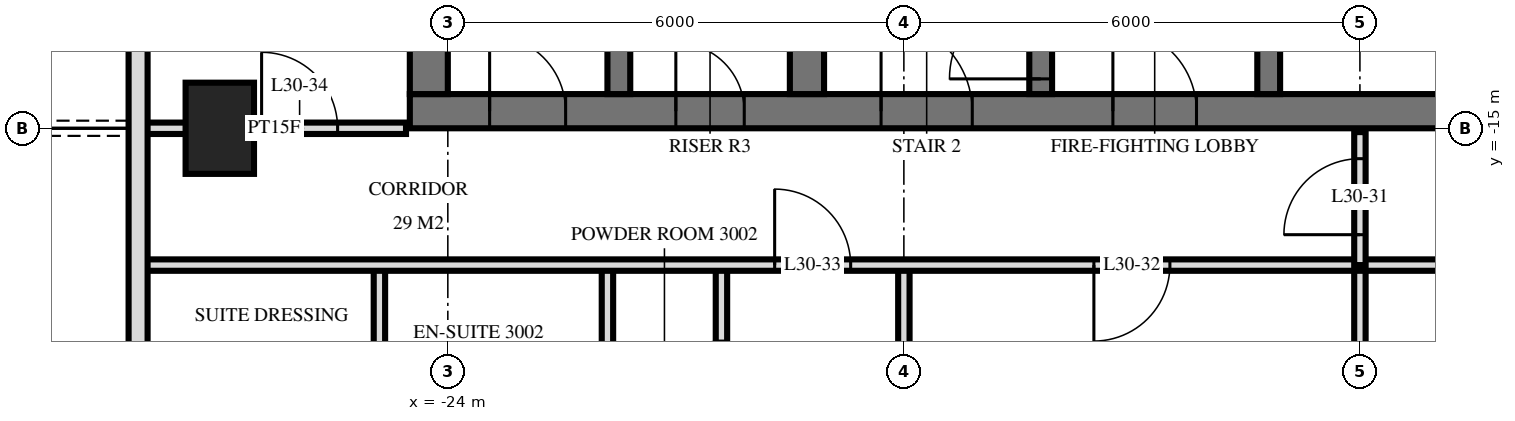
"""IFC4 building model, lengths in metres.
Left out: names, types, materials, properties, quantities, classifications, styles, units other than length and angle.
Written with IfcOpenShell. Run it as: python <this file> out.ifc"""

import sys

from ifc_helpers import new_model, si_unit, direction, frame, frame_2d, origin, origin_2d, place, context, subcontext, project, spatial, rectangle, extrude, element, fill, save


model = new_model("IFC4")
c1 = context("Model", 3, precision=1e-05, world=origin(), true_north=direction((0.0, 1.0)))
c2 = subcontext(c1, "Body", "Model", "MODEL_VIEW")
j1 = project(units=[si_unit("LENGTHUNIT", "METRE"), si_unit("PLANEANGLEUNIT", "RADIAN")], contexts=[c1])
p1 = place(None, origin())
s1 = spatial("IfcSite", under=j1, at=p1, CompositionType="ELEMENT")
p2 = place(p1, origin())
s2 = spatial("IfcBuilding", under=s1, at=p2, CompositionType="ELEMENT")
p3 = place(p2, frame((0.0, 0.0, 120.0)))
s3 = spatial("IfcBuildingStorey", under=s2, at=p3, CompositionType="ELEMENT", Elevation=120.0)
p4 = place(p3, frame((-27.0, -15.0, 0.0), z_axis=(0.0, 0.0, 1.0), x_axis=(0.0, 1.0, 0.0)))
e1 = element("IfcColumn", 1, at=p4, inside=s3, PredefinedType="COLUMN", context=c2, shape_type="SweptSolid", body=[
    extrude(rectangle(XDim=1.2, YDim=0.9, at=origin_2d()), origin(), (0.0, 0.0, 1.0), 3.6),
])
p5 = place(p3, frame((-24.5, -14.775, 0.0), z_axis=(0.0, 0.0, 1.0), x_axis=(1.0, 0.0, 0.0)))
e2 = element("IfcWall", 2, at=p5, inside=s3, PredefinedType="SHEAR", context=c2, shape_type="SweptSolid", body=[
    extrude(rectangle(XDim=14.5, YDim=0.45, at=frame_2d((7.25, 0.0))), origin(), (0.0, 0.0, 1.0), 3.6),
])
p6 = place(p5, frame((6.2, 0.0, 0.0)))
e3 = element("IfcOpeningElement", 3, at=p6, cuts=e2, PredefinedType="OPENING", context=c2, shape_type="SweptSolid", body=[
    extrude(rectangle(XDim=1.2, YDim=2.1, at=frame_2d((0.6, 1.05))), frame((0.0, 0.235, 0.0), z_axis=(0.0, -1.0, 0.0), x_axis=(1.0, 0.0, 0.0)), (0.0, 0.0, 1.0), 0.47),
])
p7 = place(p5, frame((9.25, 0.0, 0.0)))
e4 = element("IfcOpeningElement", 4, at=p7, cuts=e2, PredefinedType="OPENING", context=c2, shape_type="SweptSolid", body=[
    extrude(rectangle(XDim=1.1, YDim=2.1, at=frame_2d((0.55, 1.05))), frame((0.0, 0.235, 0.0), z_axis=(0.0, -1.0, 0.0), x_axis=(1.0, 0.0, 0.0)), (0.0, 0.0, 1.0), 0.47),
])
p8 = place(p5, frame((3.5, 0.0, 0.0)))
e5 = element("IfcOpeningElement", 5, at=p8, cuts=e2, PredefinedType="OPENING", context=c2, shape_type="SweptSolid", body=[
    extrude(rectangle(XDim=0.9, YDim=2.1, at=frame_2d((0.45, 1.05))), frame((0.0, 0.235, 0.0), z_axis=(0.0, -1.0, 0.0), x_axis=(1.0, 0.0, 0.0)), (0.0, 0.0, 1.0), 0.47),
])
p9 = place(p5, frame((1.05, 0.0, 0.0)))
e6 = element("IfcOpeningElement", 6, at=p9, cuts=e2, PredefinedType="OPENING", context=c2, shape_type="SweptSolid", body=[
    extrude(rectangle(XDim=1.0, YDim=2.1, at=frame_2d((0.5, 1.05))), frame((0.0, 0.235, 0.0), z_axis=(0.0, -1.0, 0.0), x_axis=(1.0, 0.0, 0.0)), (0.0, 0.0, 1.0), 0.47),
])
p10 = place(p3, frame((-24.25, -14.55, 0.0), z_axis=(0.0, 0.0, 1.0), x_axis=(0.0, 1.0, 0.0)))
e7 = element("IfcWall", 7, at=p10, inside=s3, PredefinedType="SHEAR", context=c2, shape_type="SweptSolid", body=[
    extrude(rectangle(XDim=14.1, YDim=0.5, at=frame_2d((7.05, 0.0))), origin(), (0.0, 0.0, 1.0), 3.6),
])
p11 = place(p3, frame((-13.2, -14.55, 0.0), z_axis=(0.0, 0.0, 1.0), x_axis=(0.0, 1.0, 0.0)))
e8 = element("IfcWall", 8, at=p11, inside=s3, PredefinedType="SHEAR", context=c2, shape_type="SweptSolid", body=[
    extrude(rectangle(XDim=5.4, YDim=0.3, at=frame_2d((2.7, 0.0))), origin(), (0.0, 0.0, 1.0), 3.6),
])
p12 = place(p11, frame((4.0, 0.0, 0.0)))
e9 = element("IfcOpeningElement", 9, at=p12, cuts=e8, PredefinedType="OPENING", context=c2, shape_type="SweptSolid", body=[
    extrude(rectangle(XDim=1.2, YDim=2.1, at=frame_2d((0.6, 1.05))), frame((0.0, 0.16, 0.0), z_axis=(0.0, -1.0, 0.0), x_axis=(1.0, 0.0, 0.0)), (0.0, 0.0, 1.0), 0.32),
])
p13 = place(p3, frame((-16.2, -14.55, 0.0), z_axis=(0.0, 0.0, 1.0), x_axis=(0.0, 1.0, 0.0)))
e10 = element("IfcWall", 10, at=p13, inside=s3, PredefinedType="SHEAR", context=c2, shape_type="SweptSolid", body=[
    extrude(rectangle(XDim=5.4, YDim=0.3, at=frame_2d((2.7, 0.0))), origin(), (0.0, 0.0, 1.0), 3.6),
])
p14 = place(p13, frame((0.2, 0.0, 0.0)))
e11 = element("IfcOpeningElement", 11, at=p14, cuts=e10, PredefinedType="OPENING", context=c2, shape_type="SweptSolid", body=[
    extrude(rectangle(XDim=1.2, YDim=2.1, at=frame_2d((0.6, 1.05))), frame((0.0, 0.16, 0.0), z_axis=(0.0, -1.0, 0.0), x_axis=(1.0, 0.0, 0.0)), (0.0, 0.0, 1.0), 0.32),
])
p15 = place(p3, frame((-19.275, -14.55, 0.0), z_axis=(0.0, 0.0, 1.0), x_axis=(0.0, 1.0, 0.0)))
e12 = element("IfcWall", 12, at=p15, inside=s3, PredefinedType="SHEAR", context=c2, shape_type="SweptSolid", body=[
    extrude(rectangle(XDim=5.4, YDim=0.45, at=frame_2d((2.7, 0.0))), origin(), (0.0, 0.0, 1.0), 3.6),
])
p16 = place(p3, frame((-21.75, -14.55, 0.0), z_axis=(0.0, 0.0, 1.0), x_axis=(0.0, 1.0, 0.0)))
e13 = element("IfcWall", 13, at=p16, inside=s3, PredefinedType="SHEAR", context=c2, shape_type="SweptSolid", body=[
    extrude(rectangle(XDim=5.4, YDim=0.3, at=frame_2d((2.7, 0.0))), origin(), (0.0, 0.0, 1.0), 3.6),
])
p17 = place(p3, frame((-28.075, -3.325, 0.0), z_axis=(0.0, 0.0, 1.0), x_axis=(0.0, -1.0, 0.0)))
e14 = element("IfcWall", 14, at=p17, inside=s3, PredefinedType="SOLIDWALL", context=c2, shape_type="SweptSolid", body=[
    extrude(rectangle(XDim=25.951, YDim=0.25, at=frame_2d((12.975, 0.0))), origin(), (0.0, 0.0, 1.0), 3.32),
])
p18 = place(p17, frame((7.025, 0.0, 0.0)))
e15 = element("IfcOpeningElement", 15, at=p18, cuts=e14, PredefinedType="OPENING", context=c2, shape_type="SweptSolid", body=[
    extrude(rectangle(XDim=1.8, YDim=2.4, at=frame_2d((0.9, 1.2))), frame((0.0, 0.135, 0.0), z_axis=(0.0, -1.0, 0.0), x_axis=(1.0, 0.0, 0.0)), (0.0, 0.0, 1.0), 0.27),
])
p19 = place(p17, frame((18.175, 0.0, 0.0)))
e16 = element("IfcOpeningElement", 16, at=p19, cuts=e14, PredefinedType="OPENING", context=c2, shape_type="SweptSolid", body=[
    extrude(rectangle(XDim=1.8, YDim=2.4, at=frame_2d((0.9, 1.2))), frame((0.0, 0.135, 0.0), z_axis=(0.0, -1.0, 0.0), x_axis=(1.0, 0.0, 0.0)), (0.0, 0.0, 1.0), 0.27),
])
p20 = place(p17, frame((21.075, 0.0, 0.0)))
e17 = element("IfcOpeningElement", 17, at=p20, cuts=e14, PredefinedType="OPENING", context=c2, shape_type="SweptSolid", body=[
    extrude(rectangle(XDim=1.8, YDim=2.4, at=frame_2d((0.9, 1.2))), frame((0.0, 0.135, 0.0), z_axis=(0.0, -1.0, 0.0), x_axis=(1.0, 0.0, 0.0)), (0.0, 0.0, 1.0), 0.27),
])
p21 = place(p17, frame((23.825, 0.0, 0.3)))
e18 = element("IfcOpeningElement", 18, at=p21, cuts=e14, PredefinedType="OPENING", context=c2, shape_type="SweptSolid", body=[
    extrude(rectangle(XDim=1.8, YDim=2.1, at=frame_2d((0.9, 1.05))), frame((0.0, 0.135, 0.0), z_axis=(0.0, -1.0, 0.0), x_axis=(1.0, 0.0, 0.0)), (0.0, 0.0, 1.0), 0.27),
])
p22 = place(p3, frame((-12.0, -16.8, 0.0), z_axis=(0.0, 0.0, 1.0), x_axis=(0.0, 1.0, 0.0)))
e19 = element("IfcWall", 19, at=p22, inside=s3, PredefinedType="PARTITIONING", context=c2, shape_type="SweptSolid", body=[
    extrude(rectangle(XDim=1.75, YDim=0.15, at=frame_2d((0.875, 0.0))), origin(), (0.0, 0.0, 1.0), 3.32),
])
p23 = place(p22, frame((0.4, 0.0, 0.0)))
e20 = element("IfcOpeningElement", 20, at=p23, cuts=e19, PredefinedType="OPENING", context=c2, shape_type="SweptSolid", body=[
    extrude(rectangle(XDim=1.0, YDim=2.1, at=frame_2d((0.5, 1.05))), frame((0.0, 0.085, 0.0), z_axis=(0.0, -1.0, 0.0), x_axis=(1.0, 0.0, 0.0)), (0.0, 0.0, 1.0), 0.17),
])
p24 = place(p3, frame((-12.0, -33.62, 0.0), z_axis=(0.0, 0.0, 1.0), x_axis=(0.0, 1.0, 0.0)))
e21 = element("IfcWall", 21, at=p24, inside=s3, PredefinedType="PARTITIONING", context=c2, shape_type="SweptSolid", body=[
    extrude(rectangle(XDim=16.82, YDim=0.15, at=frame_2d((8.41, 0.0))), origin(), (0.0, 0.0, 1.0), 3.32),
])
p25 = place(p3, frame((-18.0, -19.8, 0.0), z_axis=(0.0, 0.0, 1.0), x_axis=(0.0, 1.0, 0.0)))
e22 = element("IfcWall", 22, at=p25, inside=s3, PredefinedType="PARTITIONING", context=c2, shape_type="SweptSolid", body=[
    extrude(rectangle(XDim=3.0, YDim=0.15, at=frame_2d((1.5, 0.0))), origin(), (0.0, 0.0, 1.0), 3.32),
])
p26 = place(p3, frame((-20.4, -19.8, 0.0), z_axis=(0.0, 0.0, 1.0), x_axis=(0.0, 1.0, 0.0)))
e23 = element("IfcWall", 23, at=p26, inside=s3, PredefinedType="PARTITIONING", context=c2, shape_type="SweptSolid", body=[
    extrude(rectangle(XDim=3.0, YDim=0.15, at=frame_2d((1.5, 0.0))), origin(), (0.0, 0.0, 1.0), 3.32),
])
p27 = place(p26, frame((1.0, 0.0, 0.0)))
e24 = element("IfcOpeningElement", 24, at=p27, cuts=e23, PredefinedType="OPENING", context=c2, shape_type="SweptSolid", body=[
    extrude(rectangle(XDim=1.0, YDim=2.1, at=frame_2d((0.5, 1.05))), frame((0.0, 0.085, 0.0), z_axis=(0.0, -1.0, 0.0), x_axis=(1.0, 0.0, 0.0)), (0.0, 0.0, 1.0), 0.17),
])
p28 = place(p3, frame((-21.9, -19.8, 0.0), z_axis=(0.0, 0.0, 1.0), x_axis=(0.0, 1.0, 0.0)))
e25 = element("IfcWall", 25, at=p28, inside=s3, PredefinedType="PLUMBINGWALL", context=c2, shape_type="SweptSolid", body=[
    extrude(rectangle(XDim=3.0, YDim=0.15, at=frame_2d((1.5, 0.0))), origin(), (0.0, 0.0, 1.0), 3.32),
])
p29 = place(p3, frame((-24.9, -19.8, 0.0), z_axis=(0.0, 0.0, 1.0), x_axis=(0.0, 1.0, 0.0)))
e26 = element("IfcWall", 26, at=p29, inside=s3, PredefinedType="PARTITIONING", context=c2, shape_type="SweptSolid", body=[
    extrude(rectangle(XDim=3.0, YDim=0.15, at=frame_2d((1.5, 0.0))), origin(), (0.0, 0.0, 1.0), 3.32),
])
p30 = place(p3, frame((-28.02, -16.8, 0.0), z_axis=(0.0, 0.0, 1.0), x_axis=(1.0, 0.0, 0.0)))
e27 = element("IfcWall", 27, at=p30, inside=s3, PredefinedType="PARTITIONING", context=c2, shape_type="SweptSolid", body=[
    extrude(rectangle(XDim=56.04, YDim=0.15, at=frame_2d((28.02, 0.0))), origin(), (0.0, 0.0, 1.0), 3.32),
])
p31 = place(p30, frame((12.52, 0.0, 0.0)))
e28 = element("IfcOpeningElement", 28, at=p31, cuts=e27, PredefinedType="OPENING", context=c2, shape_type="SweptSolid", body=[
    extrude(rectangle(XDim=1.0, YDim=2.1, at=frame_2d((0.5, 1.05))), frame((0.0, 0.085, 0.0), z_axis=(0.0, -1.0, 0.0), x_axis=(1.0, 0.0, 0.0)), (0.0, 0.0, 1.0), 0.17),
])
p32 = place(p30, frame((8.32, 0.0, 0.0)))
e29 = element("IfcOpeningElement", 29, at=p32, cuts=e27, PredefinedType="OPENING", context=c2, shape_type="SweptSolid", body=[
    extrude(rectangle(XDim=1.0, YDim=2.1, at=frame_2d((0.5, 1.05))), frame((0.0, 0.085, 0.0), z_axis=(0.0, -1.0, 0.0), x_axis=(1.0, 0.0, 0.0)), (0.0, 0.0, 1.0), 0.17),
])
p33 = place(p30, frame((40.42, 0.0, 0.0)))
e30 = element("IfcOpeningElement", 30, at=p33, cuts=e27, PredefinedType="OPENING", context=c2, shape_type="SweptSolid", body=[
    extrude(rectangle(XDim=1.0, YDim=2.1, at=frame_2d((0.5, 1.05))), frame((0.0, 0.085, 0.0), z_axis=(0.0, -1.0, 0.0), x_axis=(1.0, 0.0, 0.0)), (0.0, 0.0, 1.0), 0.17),
])
p34 = place(p30, frame((46.72, 0.0, 0.0)))
e31 = element("IfcOpeningElement", 31, at=p34, cuts=e27, PredefinedType="OPENING", context=c2, shape_type="SweptSolid", body=[
    extrude(rectangle(XDim=1.0, YDim=2.1, at=frame_2d((0.5, 1.05))), frame((0.0, 0.085, 0.0), z_axis=(0.0, -1.0, 0.0), x_axis=(1.0, 0.0, 0.0)), (0.0, 0.0, 1.0), 0.17),
])
p35 = place(p30, frame((21.52, 0.0, 0.0)))
e32 = element("IfcOpeningElement", 32, at=p35, cuts=e27, PredefinedType="OPENING", context=c2, shape_type="SweptSolid", body=[
    extrude(rectangle(XDim=1.0, YDim=2.1, at=frame_2d((0.5, 1.05))), frame((0.0, 0.085, 0.0), z_axis=(0.0, -1.0, 0.0), x_axis=(1.0, 0.0, 0.0)), (0.0, 0.0, 1.0), 0.17),
])
p36 = place(p30, frame((30.52, 0.0, 0.0)))
e33 = element("IfcOpeningElement", 33, at=p36, cuts=e27, PredefinedType="OPENING", context=c2, shape_type="SweptSolid", body=[
    extrude(rectangle(XDim=1.0, YDim=2.1, at=frame_2d((0.5, 1.05))), frame((0.0, 0.085, 0.0), z_axis=(0.0, -1.0, 0.0), x_axis=(1.0, 0.0, 0.0)), (0.0, 0.0, 1.0), 0.17),
])
p37 = place(p30, frame((36.52, 0.0, 0.0)))
e34 = element("IfcOpeningElement", 34, at=p37, cuts=e27, PredefinedType="OPENING", context=c2, shape_type="SweptSolid", body=[
    extrude(rectangle(XDim=1.0, YDim=2.1, at=frame_2d((0.5, 1.05))), frame((0.0, 0.085, 0.0), z_axis=(0.0, -1.0, 0.0), x_axis=(1.0, 0.0, 0.0)), (0.0, 0.0, 1.0), 0.17),
])
p38 = place(p3, frame((-28.02, -15.0, 0.0), z_axis=(0.0, 0.0, 1.0), x_axis=(1.0, 0.0, 0.0)))
e35 = element("IfcWall", 35, at=p38, inside=s3, PredefinedType="PARTITIONING", context=c2, shape_type="SweptSolid", body=[
    extrude(rectangle(XDim=3.47, YDim=0.15, at=frame_2d((1.735, 0.0))), origin(), (0.0, 0.0, 1.0), 3.32),
])
p39 = place(p38, frame((1.57, 0.0, 0.0)))
e36 = element("IfcOpeningElement", 36, at=p39, cuts=e35, PredefinedType="OPENING", context=c2, shape_type="SweptSolid", body=[
    extrude(rectangle(XDim=1.0, YDim=2.1, at=frame_2d((0.5, 1.05))), frame((0.0, 0.085, 0.0), z_axis=(0.0, -1.0, 0.0), x_axis=(1.0, 0.0, 0.0)), (0.0, 0.0, 1.0), 0.17),
])
p40 = place(p6, origin())
e37 = element("IfcDoor", 37, at=p40, inside=s3, OperationType="SINGLE_SWING_RIGHT", PredefinedType="DOOR", context=c2, shape_type="SweptSolid", body=[
    extrude(rectangle(XDim=1.2, YDim=2.1, at=frame_2d((0.6, 1.05))), frame((0.0, 0.025, 0.0), z_axis=(0.0, -1.0, 0.0), x_axis=(1.0, 0.0, 0.0)), (0.0, 0.0, 1.0), 0.05),
])
fill(e3, e37)
p41 = place(p7, origin())
e38 = element("IfcDoor", 38, at=p41, inside=s3, OperationType="SINGLE_SWING_RIGHT", PredefinedType="DOOR", context=c2, shape_type="SweptSolid", body=[
    extrude(rectangle(XDim=1.1, YDim=2.1, at=frame_2d((0.55, 1.05))), frame((0.0, 0.025, 0.0), z_axis=(0.0, -1.0, 0.0), x_axis=(1.0, 0.0, 0.0)), (0.0, 0.0, 1.0), 0.05),
])
fill(e4, e38)
p42 = place(p8, origin())
e39 = element("IfcDoor", 39, at=p42, inside=s3, OperationType="SINGLE_SWING_RIGHT", PredefinedType="DOOR", context=c2, shape_type="SweptSolid", body=[
    extrude(rectangle(XDim=0.9, YDim=2.1, at=frame_2d((0.45, 1.05))), frame((0.0, 0.025, 0.0), z_axis=(0.0, -1.0, 0.0), x_axis=(1.0, 0.0, 0.0)), (0.0, 0.0, 1.0), 0.05),
])
fill(e5, e39)
p43 = place(p9, origin())
e40 = element("IfcDoor", 40, at=p43, inside=s3, OperationType="SINGLE_SWING_RIGHT", PredefinedType="DOOR", context=c2, shape_type="SweptSolid", body=[
    extrude(rectangle(XDim=1.0, YDim=2.1, at=frame_2d((0.5, 1.05))), frame((0.0, 0.025, 0.0), z_axis=(0.0, -1.0, 0.0), x_axis=(1.0, 0.0, 0.0)), (0.0, 0.0, 1.0), 0.05),
])
fill(e6, e40)
p44 = place(p14, origin())
e41 = element("IfcDoor", 41, at=p44, inside=s3, OperationType="SINGLE_SWING_RIGHT", PredefinedType="DOOR", context=c2, shape_type="SweptSolid", body=[
    extrude(rectangle(XDim=1.2, YDim=2.1, at=frame_2d((0.6, 1.05))), frame((0.0, 0.025, 0.0), z_axis=(0.0, -1.0, 0.0), x_axis=(1.0, 0.0, 0.0)), (0.0, 0.0, 1.0), 0.05),
])
fill(e11, e41)
p45 = place(p23, origin())
e42 = element("IfcDoor", 42, at=p45, inside=s3, OperationType="SINGLE_SWING_RIGHT", PredefinedType="DOOR", context=c2, shape_type="SweptSolid", body=[
    extrude(rectangle(XDim=1.0, YDim=2.1, at=frame_2d((0.5, 1.05))), frame((0.0, 0.025, 0.0), z_axis=(0.0, -1.0, 0.0), x_axis=(1.0, 0.0, 0.0)), (0.0, 0.0, 1.0), 0.05),
])
fill(e20, e42)
p46 = place(p31, frame((0.5, 0.0, 0.0), z_axis=(0.0, 0.0, 1.0), x_axis=(-1.0, 0.0, 0.0)))
e43 = element("IfcDoor", 43, at=p46, inside=s3, OperationType="SINGLE_SWING_LEFT", PredefinedType="DOOR", context=c2, shape_type="SweptSolid", body=[
    extrude(rectangle(XDim=1.0, YDim=2.1, at=frame_2d((0.0, 1.05))), frame((0.0, -0.025, 0.0), z_axis=(0.0, 1.0, 0.0), x_axis=(-1.0, 0.0, 0.0)), (0.0, 0.0, 1.0), 0.05),
])
fill(e28, e43)
p47 = place(p32, origin())
e44 = element("IfcDoor", 44, at=p47, inside=s3, OperationType="SINGLE_SWING_RIGHT", PredefinedType="DOOR", context=c2, shape_type="SweptSolid", body=[
    extrude(rectangle(XDim=1.0, YDim=2.1, at=frame_2d((0.5, 1.05))), frame((0.0, 0.025, 0.0), z_axis=(0.0, -1.0, 0.0), x_axis=(1.0, 0.0, 0.0)), (0.0, 0.0, 1.0), 0.05),
])
fill(e29, e44)
p48 = place(p39, origin())
e45 = element("IfcDoor", 45, at=p48, inside=s3, OperationType="SINGLE_SWING_RIGHT", PredefinedType="DOOR", context=c2, shape_type="SweptSolid", body=[
    extrude(rectangle(XDim=1.0, YDim=2.1, at=frame_2d((0.5, 1.05))), frame((0.0, 0.025, 0.0), z_axis=(0.0, -1.0, 0.0), x_axis=(1.0, 0.0, 0.0)), (0.0, 0.0, 1.0), 0.05),
])
fill(e36, e45)
save(model, sys.argv[1])
